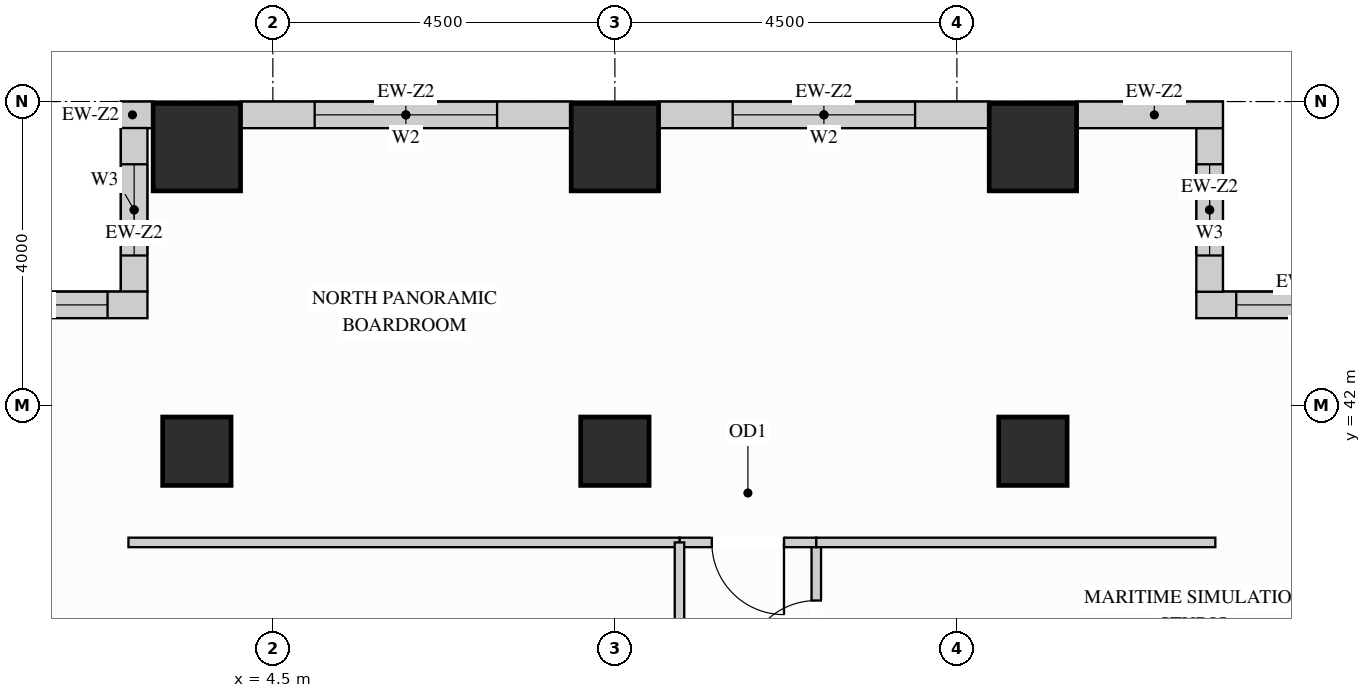
"""IFC4 building model, lengths in metres.
Left out: names, types, materials, properties, quantities, classifications, styles, units other than length and angle.
Written with IfcOpenShell. Run it as: python <this file> out.ifc"""

import sys

from ifc_helpers import new_model, si_unit, direction, frame, frame_2d, origin, origin_2d, place, context, subcontext, project, spatial, rectangle, extrude, source, transform, mapped, element, fill, save


model = new_model("IFC4")
c1 = context("Model", 3, precision=1e-05, world=origin(), true_north=direction((0.0, 1.0)))
c2 = subcontext(c1, "Body", "Model", "MODEL_VIEW")
j1 = project(units=[si_unit("LENGTHUNIT", "METRE"), si_unit("PLANEANGLEUNIT", "RADIAN")], contexts=[c1])
p1 = place(None, origin())
s1 = spatial("IfcSite", under=j1, at=p1, CompositionType="ELEMENT")
p2 = place(p1, origin())
s2 = spatial("IfcBuilding", under=s1, at=p2, CompositionType="ELEMENT")
p3 = place(p2, frame((0.0, 0.0, 102.6)))
s3 = spatial("IfcBuildingStorey", under=s2, at=p3, CompositionType="ELEMENT", Elevation=102.6)
m1 = source(origin(), c2, "Body", "SweptSolid", [
    extrude(rectangle(XDim=0.9, YDim=0.9, at=origin_2d()), origin(), (0.0, 0.0, 1.0), 3.38),
])
for number, where, z_axis, x_axis in (
    (1, (14.5, 41.4, 0.0), (0.0, 0.0, 1.0), (1.0, 0.0, 0.0)),
    (2, (3.5, 41.4, 0.0), (0.0, 0.0, 1.0), (1.0, 0.0, 0.0)),
    (3, (9.0, 41.4, 0.0), (0.0, 0.0, 1.0), (1.0, 0.0, 0.0)),
):
    element("IfcColumn", number, at=place(p3, frame(where, z_axis=z_axis, x_axis=x_axis)), inside=s3, PredefinedType="COLUMN", context=c2, shape_type="MappedRepresentation", body=[
        mapped(m1, transform((0.0, 0.0, 0.0), x_axis=(1.0, 0.0, 0.0), y_axis=(0.0, 1.0, 0.0), z_axis=(0.0, 0.0, 1.0))),
    ])
m2 = source(origin(), c2, "Body", "SweptSolid", [
    extrude(rectangle(XDim=1.15, YDim=1.15, at=origin_2d()), origin(), (0.0, 0.0, 1.0), 3.38),
])
for number, where, z_axis, x_axis in (
    (4, (14.5, 45.4, 0.0), (0.0, 0.0, 1.0), (1.0, 0.0, 0.0)),
    (5, (3.5, 45.4, 0.0), (0.0, 0.0, 1.0), (1.0, 0.0, 0.0)),
    (6, (9.0, 45.4, 0.0), (0.0, 0.0, 1.0), (1.0, 0.0, 0.0)),
):
    element("IfcColumn", number, at=place(p3, frame(where, z_axis=z_axis, x_axis=x_axis)), inside=s3, PredefinedType="COLUMN", context=c2, shape_type="MappedRepresentation", body=[
        mapped(m2, transform((0.0, 0.0, 0.0), x_axis=(1.0, 0.0, 0.0), y_axis=(0.0, 1.0, 0.0), z_axis=(0.0, 0.0, 1.0))),
    ])
p4 = place(p3, frame((19.5, 43.325, 0.0), z_axis=(0.0, 0.0, 1.0), x_axis=(-1.0, 0.0, 0.0)))
e7 = element("IfcWall", 7, at=p4, inside=s3, PredefinedType="SOLIDWALL", context=c2, shape_type="SweptSolid", body=[
    extrude(rectangle(XDim=2.85, YDim=0.35, at=frame_2d((1.425, 0.0))), origin(), (0.0, 0.0, 1.0), 3.365),
])
p5 = place(p4, frame((0.525, 0.0, 0.78)))
e8 = element("IfcOpeningElement", 8, at=p5, cuts=e7, PredefinedType="OPENING", context=c2, shape_type="SweptSolid", body=[
    extrude(rectangle(XDim=1.8, YDim=2.1, at=frame_2d((0.9, 1.05))), frame((0.0, 0.185, 0.0), z_axis=(0.0, -1.0, 0.0), x_axis=(1.0, 0.0, 0.0)), (0.0, 0.0, 1.0), 0.37),
])
p6 = place(p3, frame((16.825, 43.498, 0.0), z_axis=(0.0, 0.0, 1.0), x_axis=(0.0, 1.0, 0.0)))
e9 = element("IfcWall", 9, at=p6, inside=s3, PredefinedType="SOLIDWALL", context=c2, shape_type="SweptSolid", body=[
    extrude(rectangle(XDim=2.154, YDim=0.35, at=frame_2d((1.077, 0.0))), origin(), (0.0, 0.0, 1.0), 3.365),
])
p7 = place(p6, frame((0.477, 0.0, 0.78)))
e10 = element("IfcOpeningElement", 10, at=p7, cuts=e9, PredefinedType="OPENING", context=c2, shape_type="SweptSolid", body=[
    extrude(rectangle(XDim=1.2, YDim=2.1, at=frame_2d((0.6, 1.05))), frame((0.0, 0.185, 0.0), z_axis=(0.0, -1.0, 0.0), x_axis=(1.0, 0.0, 0.0)), (0.0, 0.0, 1.0), 0.37),
])
m3 = source(origin(), c2, "Body", "SweptSolid", [
    extrude(rectangle(XDim=1.927, YDim=0.35, at=frame_2d((0.963, 0.0))), origin(), (0.0, 0.0, 1.0), 3.365),
])
p8 = place(p3, frame((17.0, 45.825, 0.0), z_axis=(0.0, 0.0, 1.0), x_axis=(-1.0, 0.0, 0.0)))
e11 = element("IfcWall", 11, at=p8, inside=s3, PredefinedType="SOLIDWALL", context=c2, shape_type="MappedRepresentation", body=[
    mapped(m3, transform((0.0, 0.0, 0.0), x_axis=(1.0, 0.0, 0.0), y_axis=(0.0, 1.0, 0.0), z_axis=(0.0, 0.0, 1.0))),
])
p9 = place(p3, frame((13.927, 45.825, 0.0), z_axis=(0.0, 0.0, 1.0), x_axis=(-1.0, 0.0, 0.0)))
e12 = element("IfcWall", 12, at=p9, inside=s3, PredefinedType="SOLIDWALL", context=c2, shape_type="SweptSolid", body=[
    extrude(rectangle(XDim=4.354, YDim=0.35, at=frame_2d((2.177, 0.0))), origin(), (0.0, 0.0, 1.0), 3.365),
])
p10 = place(p9, frame((0.977, 0.0, 0.78)))
e13 = element("IfcOpeningElement", 13, at=p10, cuts=e12, PredefinedType="OPENING", context=c2, shape_type="SweptSolid", body=[
    extrude(rectangle(XDim=2.4, YDim=2.1, at=frame_2d((1.2, 1.05))), frame((0.0, 0.185, 0.0), z_axis=(0.0, -1.0, 0.0), x_axis=(1.0, 0.0, 0.0)), (0.0, 0.0, 1.0), 0.37),
])
p11 = place(p3, frame((8.427, 45.825, 0.0), z_axis=(0.0, 0.0, 1.0), x_axis=(-1.0, 0.0, 0.0)))
e14 = element("IfcWall", 14, at=p11, inside=s3, PredefinedType="SOLIDWALL", context=c2, shape_type="SweptSolid", body=[
    extrude(rectangle(XDim=4.354, YDim=0.35, at=frame_2d((2.177, 0.0))), origin(), (0.0, 0.0, 1.0), 3.365),
])
p12 = place(p11, frame((0.977, 0.0, 0.78)))
e15 = element("IfcOpeningElement", 15, at=p12, cuts=e14, PredefinedType="OPENING", context=c2, shape_type="SweptSolid", body=[
    extrude(rectangle(XDim=2.4, YDim=2.1, at=frame_2d((1.2, 1.05))), frame((0.0, 0.185, 0.0), z_axis=(0.0, -1.0, 0.0), x_axis=(1.0, 0.0, 0.0)), (0.0, 0.0, 1.0), 0.37),
])
m4 = source(origin(), c2, "Body", "SweptSolid", [
    extrude(rectangle(XDim=0.427, YDim=0.35, at=frame_2d((0.213, 0.0))), origin(), (0.0, 0.0, 1.0), 3.365),
])
p13 = place(p3, frame((2.927, 45.825, 0.0), z_axis=(0.0, 0.0, 1.0), x_axis=(-1.0, 0.0, 0.0)))
e16 = element("IfcWall", 16, at=p13, inside=s3, PredefinedType="SOLIDWALL", context=c2, shape_type="MappedRepresentation", body=[
    mapped(m4, transform((0.0, 0.0, 0.0), x_axis=(1.0, 0.0, 0.0), y_axis=(0.0, 1.0, 0.0), z_axis=(0.0, 0.0, 1.0))),
])
p14 = place(p3, frame((2.675, 45.652, 0.0), z_axis=(0.0, 0.0, 1.0), x_axis=(0.0, -1.0, 0.0)))
e17 = element("IfcWall", 17, at=p14, inside=s3, PredefinedType="SOLIDWALL", context=c2, shape_type="SweptSolid", body=[
    extrude(rectangle(XDim=2.154, YDim=0.35, at=frame_2d((1.077, 0.0))), origin(), (0.0, 0.0, 1.0), 3.365),
])
p15 = place(p14, frame((0.477, 0.0, 0.78)))
e18 = element("IfcOpeningElement", 18, at=p15, cuts=e17, PredefinedType="OPENING", context=c2, shape_type="SweptSolid", body=[
    extrude(rectangle(XDim=1.2, YDim=2.1, at=frame_2d((0.6, 1.05))), frame((0.0, 0.185, 0.0), z_axis=(0.0, -1.0, 0.0), x_axis=(1.0, 0.0, 0.0)), (0.0, 0.0, 1.0), 0.37),
])
p16 = place(p3, frame((2.85, 43.325, 0.0), z_axis=(0.0, 0.0, 1.0), x_axis=(-1.0, 0.0, 0.0)))
e19 = element("IfcWall", 19, at=p16, inside=s3, PredefinedType="SOLIDWALL", context=c2, shape_type="SweptSolid", body=[
    extrude(rectangle(XDim=2.85, YDim=0.35, at=frame_2d((1.425, 0.0))), origin(), (0.0, 0.0, 1.0), 3.365),
])
p17 = place(p16, frame((0.525, 0.0, 0.78)))
e20 = element("IfcOpeningElement", 20, at=p17, cuts=e19, PredefinedType="OPENING", context=c2, shape_type="SweptSolid", body=[
    extrude(rectangle(XDim=1.8, YDim=2.1, at=frame_2d((0.9, 1.05))), frame((0.0, 0.185, 0.0), z_axis=(0.0, -1.0, 0.0), x_axis=(1.0, 0.0, 0.0)), (0.0, 0.0, 1.0), 0.37),
])
p18 = place(p3, frame((11.65, 37.721, 0.0), z_axis=(0.0, 0.0, 1.0), x_axis=(0.0, 1.0, 0.0)))
e21 = element("IfcWall", 21, at=p18, inside=s3, PredefinedType="PARTITIONING", context=c2, shape_type="SweptSolid", body=[
    extrude(rectangle(XDim=2.479, YDim=0.125, at=frame_2d((1.24, 0.0))), origin(), (0.0, 0.0, 1.0), 3.365),
])
p19 = place(p18, frame((0.764, 0.0, 0.0)))
e22 = element("IfcOpeningElement", 22, at=p19, cuts=e21, PredefinedType="OPENING", context=c2, shape_type="SweptSolid", body=[
    extrude(rectangle(XDim=0.95, YDim=2.15, at=frame_2d((0.475, 1.075))), frame((0.0, 0.073, 0.0), z_axis=(0.0, -1.0, 0.0), x_axis=(1.0, 0.0, 0.0)), (0.0, 0.0, 1.0), 0.145),
])
p20 = place(p3, frame((9.85, 40.2, 0.0), z_axis=(0.0, 0.0, 1.0), x_axis=(1.0, 0.0, 0.0)))
e23 = element("IfcWall", 23, at=p20, inside=s3, PredefinedType="PARTITIONING", context=c2, shape_type="SweptSolid", body=[
    extrude(rectangle(XDim=1.8, YDim=0.125, at=frame_2d((0.9, 0.0))), origin(), (0.0, 0.0, 1.0), 3.365),
])
p21 = place(p20, frame((0.425, 0.0, 0.0)))
e24 = element("IfcOpeningElement", 24, at=p21, cuts=e23, PredefinedType="OPENING", context=c2, shape_type="SweptSolid", body=[
    extrude(rectangle(XDim=0.95, YDim=2.15, at=frame_2d((0.475, 1.075))), frame((0.0, 0.073, 0.0), z_axis=(0.0, -1.0, 0.0), x_axis=(1.0, 0.0, 0.0)), (0.0, 0.0, 1.0), 0.145),
])
m5 = source(origin(), c2, "Body", "SweptSolid", [
    extrude(rectangle(XDim=5.25, YDim=0.125, at=frame_2d((2.625, 0.0))), origin(), (0.0, 0.0, 1.0), 3.365),
])
p22 = place(p3, frame((11.65, 40.2, 0.0), z_axis=(0.0, 0.0, 1.0), x_axis=(1.0, 0.0, 0.0)))
e25 = element("IfcWall", 25, at=p22, inside=s3, PredefinedType="PARTITIONING", context=c2, shape_type="MappedRepresentation", body=[
    mapped(m5, transform((0.0, 0.0, 0.0), x_axis=(1.0, 0.0, 0.0), y_axis=(0.0, 1.0, 0.0), z_axis=(0.0, 0.0, 1.0))),
])
m6 = source(origin(), c2, "Body", "SweptSolid", [
    extrude(rectangle(XDim=7.25, YDim=0.125, at=frame_2d((3.625, 0.0))), origin(), (0.0, 0.0, 1.0), 3.365),
])
p23 = place(p3, frame((2.6, 40.2, 0.0), z_axis=(0.0, 0.0, 1.0), x_axis=(1.0, 0.0, 0.0)))
e26 = element("IfcWall", 26, at=p23, inside=s3, PredefinedType="PARTITIONING", context=c2, shape_type="MappedRepresentation", body=[
    mapped(m6, transform((0.0, 0.0, 0.0), x_axis=(1.0, 0.0, 0.0), y_axis=(0.0, 1.0, 0.0), z_axis=(0.0, 0.0, 1.0))),
])
p24 = place(p3, frame((9.85, 35.498, 0.0), z_axis=(0.0, 0.0, 1.0), x_axis=(0.0, 1.0, 0.0)))
e27 = element("IfcWall", 27, at=p24, inside=s3, PredefinedType="PARTITIONING", context=c2, shape_type="SweptSolid", body=[
    extrude(rectangle(XDim=4.702, YDim=0.125, at=frame_2d((2.351, 0.0))), origin(), (0.0, 0.0, 1.0), 3.365),
])
p25 = place(p24, frame((0.392, 0.0, 0.0)))
e28 = element("IfcOpeningElement", 28, at=p25, cuts=e27, PredefinedType="OPENING", context=c2, shape_type="SweptSolid", body=[
    extrude(rectangle(XDim=0.95, YDim=2.15, at=frame_2d((0.475, 1.075))), frame((0.0, 0.073, 0.0), z_axis=(0.0, -1.0, 0.0), x_axis=(1.0, 0.0, 0.0)), (0.0, 0.0, 1.0), 0.145),
])
m7 = source(origin(), c2, "Body", "SweptSolid", [
    extrude(rectangle(XDim=0.95, YDim=2.15, at=frame_2d((0.475, 1.075))), frame((0.0, 0.025, 0.0), z_axis=(0.0, -1.0, 0.0), x_axis=(1.0, 0.0, 0.0)), (0.0, 0.0, 1.0), 0.05),
])
p26 = place(p19, origin())
e29 = element("IfcDoor", 29, at=p26, inside=s3, OperationType="SINGLE_SWING_LEFT", PredefinedType="DOOR", context=c2, shape_type="MappedRepresentation", body=[
    mapped(m7, transform((0.0, 0.0, 0.0), x_axis=(1.0, 0.0, 0.0), y_axis=(0.0, 1.0, 0.0), z_axis=(0.0, 0.0, 1.0))),
])
fill(e22, e29)
p27 = place(p21, origin())
e30 = element("IfcDoor", 30, at=p27, inside=s3, OperationType="SINGLE_SWING_RIGHT", PredefinedType="DOOR", context=c2, shape_type="MappedRepresentation", body=[
    mapped(m7, transform((0.0, 0.0, 0.0), x_axis=(1.0, 0.0, 0.0), y_axis=(0.0, 1.0, 0.0), z_axis=(0.0, 0.0, 1.0))),
])
fill(e24, e30)
m8 = source(origin(), c2, "Body", "SweptSolid", [
    extrude(rectangle(XDim=1.8, YDim=2.1, at=frame_2d((0.9, 1.05))), frame((0.0, 0.03, 0.0), z_axis=(0.0, -1.0, 0.0), x_axis=(1.0, 0.0, 0.0)), (0.0, 0.0, 1.0), 0.06),
])
p28 = place(p5, origin())
e31 = element("IfcWindow", 31, at=p28, inside=s3, PartitioningType="SINGLE_PANEL", PredefinedType="WINDOW", context=c2, shape_type="MappedRepresentation", body=[
    mapped(m8, transform((0.0, 0.0, 0.0), x_axis=(1.0, 0.0, 0.0), y_axis=(0.0, 1.0, 0.0), z_axis=(0.0, 0.0, 1.0))),
])
fill(e8, e31)
p29 = place(p17, origin())
e32 = element("IfcWindow", 32, at=p29, inside=s3, PartitioningType="SINGLE_PANEL", PredefinedType="WINDOW", context=c2, shape_type="MappedRepresentation", body=[
    mapped(m8, transform((0.0, 0.0, 0.0), x_axis=(1.0, 0.0, 0.0), y_axis=(0.0, 1.0, 0.0), z_axis=(0.0, 0.0, 1.0))),
])
fill(e20, e32)
m9 = source(origin(), c2, "Body", "SweptSolid", [
    extrude(rectangle(XDim=2.4, YDim=2.1, at=frame_2d((1.2, 1.05))), frame((0.0, 0.03, 0.0), z_axis=(0.0, -1.0, 0.0), x_axis=(1.0, 0.0, 0.0)), (0.0, 0.0, 1.0), 0.06),
])
p30 = place(p10, origin())
e33 = element("IfcWindow", 33, at=p30, inside=s3, PartitioningType="SINGLE_PANEL", PredefinedType="WINDOW", context=c2, shape_type="MappedRepresentation", body=[
    mapped(m9, transform((0.0, 0.0, 0.0), x_axis=(1.0, 0.0, 0.0), y_axis=(0.0, 1.0, 0.0), z_axis=(0.0, 0.0, 1.0))),
])
fill(e13, e33)
p31 = place(p12, origin())
e34 = element("IfcWindow", 34, at=p31, inside=s3, PartitioningType="SINGLE_PANEL", PredefinedType="WINDOW", context=c2, shape_type="MappedRepresentation", body=[
    mapped(m9, transform((0.0, 0.0, 0.0), x_axis=(1.0, 0.0, 0.0), y_axis=(0.0, 1.0, 0.0), z_axis=(0.0, 0.0, 1.0))),
])
fill(e15, e34)
m10 = source(origin(), c2, "Body", "SweptSolid", [
    extrude(rectangle(XDim=1.2, YDim=2.1, at=frame_2d((0.6, 1.05))), frame((0.0, 0.03, 0.0), z_axis=(0.0, -1.0, 0.0), x_axis=(1.0, 0.0, 0.0)), (0.0, 0.0, 1.0), 0.06),
])
p32 = place(p7, origin())
e35 = element("IfcWindow", 35, at=p32, inside=s3, PartitioningType="SINGLE_PANEL", PredefinedType="WINDOW", context=c2, shape_type="MappedRepresentation", body=[
    mapped(m10, transform((0.0, 0.0, 0.0), x_axis=(1.0, 0.0, 0.0), y_axis=(0.0, 1.0, 0.0), z_axis=(0.0, 0.0, 1.0))),
])
fill(e10, e35)
p33 = place(p15, origin())
e36 = element("IfcWindow", 36, at=p33, inside=s3, PartitioningType="SINGLE_PANEL", PredefinedType="WINDOW", context=c2, shape_type="MappedRepresentation", body=[
    mapped(m10, transform((0.0, 0.0, 0.0), x_axis=(1.0, 0.0, 0.0), y_axis=(0.0, 1.0, 0.0), z_axis=(0.0, 0.0, 1.0))),
])
fill(e18, e36)
save(model, sys.argv[1])
